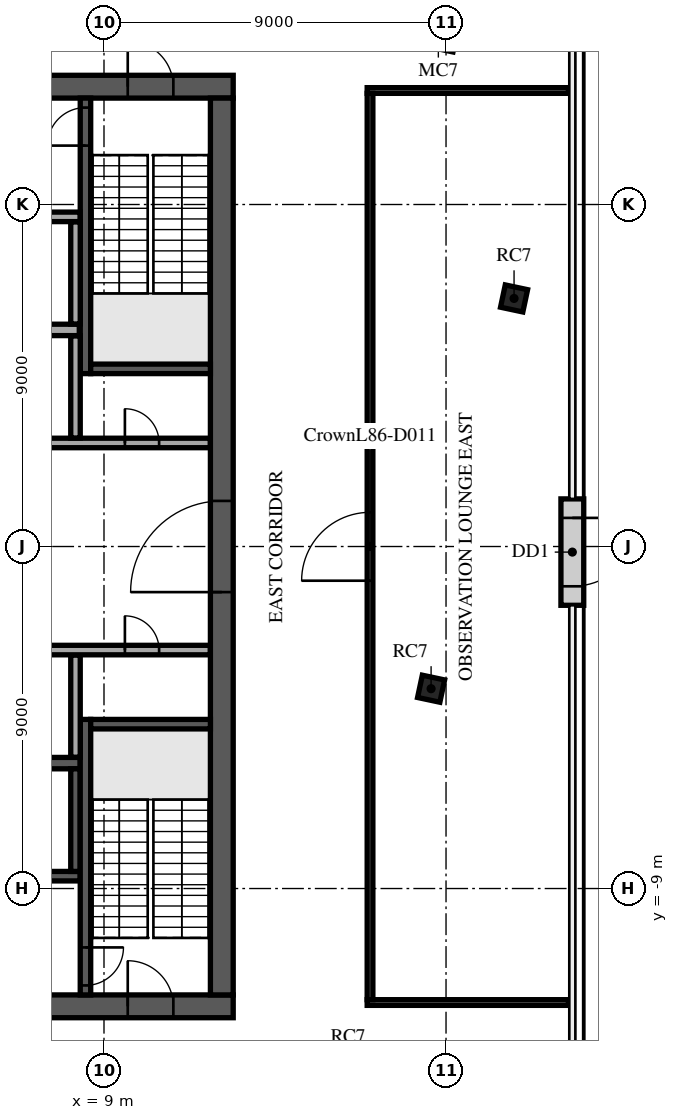
"""IFC4 building model, lengths in metres.
Left out: names, types, materials, properties, quantities, classifications, styles, units other than length and angle.
Written with IfcOpenShell. Run it as: python <this file> out.ifc"""

import sys

from ifc_helpers import new_model, si_unit, direction, frame, frame_2d, origin, origin_2d, place, context, subcontext, project, spatial, rectangle, extrude, element, fill, save


model = new_model("IFC4")
c1 = context("Model", 3, precision=1e-05, world=origin(), true_north=direction((0.0, 1.0)))
c2 = subcontext(c1, "Body", "Model", "MODEL_VIEW")
j1 = project(units=[si_unit("LENGTHUNIT", "METRE"), si_unit("PLANEANGLEUNIT", "RADIAN")], contexts=[c1])
p1 = place(None, origin())
s1 = spatial("IfcSite", under=j1, at=p1, CompositionType="ELEMENT")
p2 = place(p1, origin())
s2 = spatial("IfcBuilding", under=s1, at=p2, CompositionType="ELEMENT")
p3 = place(p2, frame((0.0, 0.0, 368.1)))
s3 = spatial("IfcBuildingStorey", under=s2, at=p3, CompositionType="ELEMENT", Elevation=368.1)
for number, where, z_axis, x_axis in (
    (1, (17.607, -3.742, 0.0), (0.0, 0.0, 1.0), (0.208, 0.978, 0.0)),
    (2, (19.79, 6.528, 0.0), (0.0, 0.0, 1.0), (0.208, 0.978, 0.0)),
):
    element("IfcColumn", number, at=place(p3, frame(where, z_axis=z_axis, x_axis=x_axis)), inside=s3, PredefinedType="COLUMN", context=c2, shape_type="SweptSolid", body=[
        extrude(rectangle(XDim=0.6, YDim=0.6, at=origin_2d()), origin(), (0.0, 0.0, 1.0), 5.0),
    ])
p4 = place(p3, frame((-12.4, 12.1, 0.0), z_axis=(0.0, 0.0, 1.0), x_axis=(1.0, 0.0, 0.0)))
e3 = element("IfcWall", 3, at=p4, inside=s3, PredefinedType="SHEAR", context=c2, shape_type="SweptSolid", body=[
    extrude(rectangle(XDim=24.8, YDim=0.6, at=frame_2d((12.4, 0.0))), origin(), (0.0, 0.0, 1.0), 4.7),
])
p5 = place(p4, frame((11.2, 0.0, 0.0)))
e4 = element("IfcOpeningElement", 4, at=p5, cuts=e3, PredefinedType="OPENING", context=c2, shape_type="SweptSolid", body=[
    extrude(rectangle(XDim=2.4, YDim=2.4, at=frame_2d((1.2, 1.2))), frame((0.0, 0.31, 0.0), z_axis=(0.0, -1.0, 0.0), x_axis=(1.0, 0.0, 0.0)), (0.0, 0.0, 1.0), 0.62),
])
p6 = place(p4, frame((22.025, 0.0, 0.0)))
e5 = element("IfcOpeningElement", 5, at=p6, cuts=e3, PredefinedType="OPENING", context=c2, shape_type="SweptSolid", body=[
    extrude(rectangle(XDim=1.2, YDim=2.1, at=frame_2d((0.6, 1.05))), frame((0.0, 0.31, 0.0), z_axis=(0.0, -1.0, 0.0), x_axis=(1.0, 0.0, 0.0)), (0.0, 0.0, 1.0), 0.62),
])
p7 = place(p4, frame((1.0, 0.0, 0.0)))
e6 = element("IfcOpeningElement", 6, at=p7, cuts=e3, PredefinedType="OPENING", context=c2, shape_type="SweptSolid", body=[
    extrude(rectangle(XDim=1.0, YDim=2.1, at=frame_2d((0.5, 1.05))), frame((0.0, 0.31, 0.0), z_axis=(0.0, -1.0, 0.0), x_axis=(1.0, 0.0, 0.0)), (0.0, 0.0, 1.0), 0.62),
])
p8 = place(p3, frame((-12.4, -12.1, 0.0), z_axis=(0.0, 0.0, 1.0), x_axis=(1.0, 0.0, 0.0)))
e7 = element("IfcWall", 7, at=p8, inside=s3, PredefinedType="SHEAR", context=c2, shape_type="SweptSolid", body=[
    extrude(rectangle(XDim=24.8, YDim=0.6, at=frame_2d((12.4, 0.0))), origin(), (0.0, 0.0, 1.0), 4.7),
])
p9 = place(p8, frame((7.3, 0.0, 0.0)))
e8 = element("IfcOpeningElement", 8, at=p9, cuts=e7, PredefinedType="OPENING", context=c2, shape_type="SweptSolid", body=[
    extrude(rectangle(XDim=2.0, YDim=2.1, at=frame_2d((1.0, 1.05))), frame((0.0, 0.31, 0.0), z_axis=(0.0, -1.0, 0.0), x_axis=(1.0, 0.0, 0.0)), (0.0, 0.0, 1.0), 0.62),
])
p10 = place(p8, frame((17.425, 0.0, 0.0)))
e9 = element("IfcOpeningElement", 9, at=p10, cuts=e7, PredefinedType="OPENING", context=c2, shape_type="SweptSolid", body=[
    extrude(rectangle(XDim=1.2, YDim=2.1, at=frame_2d((0.6, 1.05))), frame((0.0, 0.31, 0.0), z_axis=(0.0, -1.0, 0.0), x_axis=(1.0, 0.0, 0.0)), (0.0, 0.0, 1.0), 0.62),
])
p11 = place(p8, frame((1.575, 0.0, 0.0)))
e10 = element("IfcOpeningElement", 10, at=p11, cuts=e7, PredefinedType="OPENING", context=c2, shape_type="SweptSolid", body=[
    extrude(rectangle(XDim=1.2, YDim=2.1, at=frame_2d((0.6, 1.05))), frame((0.0, 0.31, 0.0), z_axis=(0.0, -1.0, 0.0), x_axis=(1.0, 0.0, 0.0)), (0.0, 0.0, 1.0), 0.62),
])
p12 = place(p8, frame((22.025, 0.0, 0.0)))
e11 = element("IfcOpeningElement", 11, at=p12, cuts=e7, PredefinedType="OPENING", context=c2, shape_type="SweptSolid", body=[
    extrude(rectangle(XDim=1.2, YDim=2.1, at=frame_2d((0.6, 1.05))), frame((0.0, 0.31, 0.0), z_axis=(0.0, -1.0, 0.0), x_axis=(1.0, 0.0, 0.0)), (0.0, 0.0, 1.0), 0.62),
])
p13 = place(p3, frame((12.1, -11.8, 0.0), z_axis=(0.0, 0.0, 1.0), x_axis=(0.0, 1.0, 0.0)))
e12 = element("IfcWall", 12, at=p13, inside=s3, PredefinedType="SHEAR", context=c2, shape_type="SweptSolid", body=[
    extrude(rectangle(XDim=23.6, YDim=0.6, at=frame_2d((11.8, 0.0))), origin(), (0.0, 0.0, 1.0), 4.7),
])
p14 = place(p13, frame((10.6, 0.0, 0.0)))
e13 = element("IfcOpeningElement", 13, at=p14, cuts=e12, PredefinedType="OPENING", context=c2, shape_type="SweptSolid", body=[
    extrude(rectangle(XDim=2.4, YDim=2.4, at=frame_2d((1.2, 1.2))), frame((0.0, 0.31, 0.0), z_axis=(0.0, -1.0, 0.0), x_axis=(1.0, 0.0, 0.0)), (0.0, 0.0, 1.0), 0.62),
])
p15 = place(p3, frame((-2.875, -5.7, 0.0), z_axis=(0.0, 0.0, 1.0), x_axis=(1.0, 0.0, 0.0)))
e14 = element("IfcWall", 14, at=p15, inside=s3, PredefinedType="SOLIDWALL", context=c2, shape_type="SweptSolid", body=[
    extrude(rectangle(XDim=11.25, YDim=0.3, at=frame_2d((5.625, 0.0))), origin(), (0.0, 0.0, 1.0), 4.7),
])
p16 = place(p3, frame((-2.875, -8.675, 0.0), z_axis=(0.0, 0.0, 1.0), x_axis=(1.0, 0.0, 0.0)))
e15 = element("IfcWall", 15, at=p16, inside=s3, PredefinedType="SOLIDWALL", context=c2, shape_type="SweptSolid", body=[
    extrude(rectangle(XDim=11.25, YDim=0.25, at=frame_2d((5.625, 0.0))), origin(), (0.0, 0.0, 1.0), 4.7),
])
p17 = place(p16, frame((0.9, 0.0, 0.0)))
e16 = element("IfcOpeningElement", 16, at=p17, cuts=e15, PredefinedType="OPENING", context=c2, shape_type="SweptSolid", body=[
    extrude(rectangle(XDim=1.2, YDim=2.1, at=frame_2d((0.6, 1.05))), frame((0.0, 0.135, 0.0), z_axis=(0.0, -1.0, 0.0), x_axis=(1.0, 0.0, 0.0)), (0.0, 0.0, 1.0), 0.27),
])
p18 = place(p16, frame((3.65, 0.0, 0.0)))
e17 = element("IfcOpeningElement", 17, at=p18, cuts=e15, PredefinedType="OPENING", context=c2, shape_type="SweptSolid", body=[
    extrude(rectangle(XDim=1.2, YDim=2.1, at=frame_2d((0.6, 1.05))), frame((0.0, 0.135, 0.0), z_axis=(0.0, -1.0, 0.0), x_axis=(1.0, 0.0, 0.0)), (0.0, 0.0, 1.0), 0.27),
])
p19 = place(p16, frame((6.4, 0.0, 0.0)))
e18 = element("IfcOpeningElement", 18, at=p19, cuts=e15, PredefinedType="OPENING", context=c2, shape_type="SweptSolid", body=[
    extrude(rectangle(XDim=1.2, YDim=2.1, at=frame_2d((0.6, 1.05))), frame((0.0, 0.135, 0.0), z_axis=(0.0, -1.0, 0.0), x_axis=(1.0, 0.0, 0.0)), (0.0, 0.0, 1.0), 0.27),
])
p20 = place(p16, frame((9.15, 0.0, 0.0)))
e19 = element("IfcOpeningElement", 19, at=p20, cuts=e15, PredefinedType="OPENING", context=c2, shape_type="SweptSolid", body=[
    extrude(rectangle(XDim=1.2, YDim=2.1, at=frame_2d((0.6, 1.05))), frame((0.0, 0.135, 0.0), z_axis=(0.0, -1.0, 0.0), x_axis=(1.0, 0.0, 0.0)), (0.0, 0.0, 1.0), 0.27),
])
p21 = place(p3, frame((8.25, -8.55, 0.0), z_axis=(0.0, 0.0, 1.0), x_axis=(0.0, 1.0, 0.0)))
e20 = element("IfcWall", 20, at=p21, inside=s3, PredefinedType="SOLIDWALL", context=c2, shape_type="SweptSolid", body=[
    extrude(rectangle(XDim=2.7, YDim=0.25, at=frame_2d((1.35, 0.0))), origin(), (0.0, 0.0, 1.0), 4.7),
])
p22 = place(p3, frame((8.512, 4.55, 0.0), z_axis=(0.0, 0.0, 1.0), x_axis=(0.0, 1.0, 0.0)))
e21 = element("IfcWall", 21, at=p22, inside=s3, PredefinedType="SOLIDWALL", context=c2, shape_type="SweptSolid", body=[
    extrude(rectangle(XDim=7.25, YDim=0.275, at=frame_2d((3.625, 0.0))), origin(), (0.0, 0.0, 1.0), 4.7),
])
p23 = place(p22, frame((6.0, 0.0, 0.0)))
e22 = element("IfcOpeningElement", 22, at=p23, cuts=e21, PredefinedType="OPENING", context=c2, shape_type="SweptSolid", body=[
    extrude(rectangle(XDim=1.0, YDim=2.1, at=frame_2d((0.5, 1.05))), frame((0.0, 0.147, 0.0), z_axis=(0.0, -1.0, 0.0), x_axis=(1.0, 0.0, 0.0)), (0.0, 0.0, 1.0), 0.295),
])
p24 = place(p3, frame((8.65, 4.675, 0.0), z_axis=(0.0, 0.0, 1.0), x_axis=(1.0, 0.0, 0.0)))
e23 = element("IfcWall", 23, at=p24, inside=s3, PredefinedType="SOLIDWALL", context=c2, shape_type="SweptSolid", body=[
    extrude(rectangle(XDim=3.15, YDim=0.25, at=frame_2d((1.575, 0.0))), origin(), (0.0, 0.0, 1.0), 4.7),
])
p25 = place(p3, frame((8.512, -4.55, 0.0), z_axis=(0.0, 0.0, 1.0), x_axis=(0.0, -1.0, 0.0)))
e24 = element("IfcWall", 24, at=p25, inside=s3, PredefinedType="SOLIDWALL", context=c2, shape_type="SweptSolid", body=[
    extrude(rectangle(XDim=7.25, YDim=0.275, at=frame_2d((3.625, 0.0))), origin(), (0.0, 0.0, 1.0), 4.7),
])
p26 = place(p25, frame((6.0, 0.0, 0.0)))
e25 = element("IfcOpeningElement", 25, at=p26, cuts=e24, PredefinedType="OPENING", context=c2, shape_type="SweptSolid", body=[
    extrude(rectangle(XDim=1.0, YDim=2.1, at=frame_2d((0.5, 1.05))), frame((0.0, 0.147, 0.0), z_axis=(0.0, -1.0, 0.0), x_axis=(1.0, 0.0, 0.0)), (0.0, 0.0, 1.0), 0.295),
])
p27 = place(p3, frame((8.65, -4.675, 0.0), z_axis=(0.0, 0.0, 1.0), x_axis=(1.0, 0.0, 0.0)))
e26 = element("IfcWall", 26, at=p27, inside=s3, PredefinedType="SOLIDWALL", context=c2, shape_type="SweptSolid", body=[
    extrude(rectangle(XDim=3.15, YDim=0.25, at=frame_2d((1.575, 0.0))), origin(), (0.0, 0.0, 1.0), 4.7),
])
p28 = place(p3, frame((8.25, -5.545, 0.0), z_axis=(0.0, 0.0, 1.0), x_axis=(0.0, 1.0, 0.0)))
e27 = element("IfcWall", 27, at=p28, inside=s3, PredefinedType="PARTITIONING", context=c2, shape_type="SweptSolid", body=[
    extrude(rectangle(XDim=2.69, YDim=0.25, at=frame_2d((1.345, 0.0))), origin(), (0.0, 0.0, 1.0), 4.7),
])
p29 = place(p3, frame((5.63, -2.725, 0.0), z_axis=(0.0, 0.0, 1.0), x_axis=(1.0, 0.0, 0.0)))
e28 = element("IfcWall", 28, at=p29, inside=s3, PredefinedType="PARTITIONING", context=c2, shape_type="SweptSolid", body=[
    extrude(rectangle(XDim=6.165, YDim=0.25, at=frame_2d((3.083, 0.0))), origin(), (0.0, 0.0, 1.0), 4.7),
])
p30 = place(p29, frame((0.745, 0.0, 0.0)))
e29 = element("IfcOpeningElement", 29, at=p30, cuts=e28, PredefinedType="OPENING", context=c2, shape_type="SweptSolid", body=[
    extrude(rectangle(XDim=1.0, YDim=2.1, at=frame_2d((0.5, 1.05))), frame((0.0, 0.135, 0.0), z_axis=(0.0, -1.0, 0.0), x_axis=(1.0, 0.0, 0.0)), (0.0, 0.0, 1.0), 0.27),
])
p31 = place(p29, frame((3.92, 0.0, 0.0)))
e30 = element("IfcOpeningElement", 30, at=p31, cuts=e28, PredefinedType="OPENING", context=c2, shape_type="SweptSolid", body=[
    extrude(rectangle(XDim=0.9, YDim=2.1, at=frame_2d((0.45, 1.05))), frame((0.0, 0.135, 0.0), z_axis=(0.0, -1.0, 0.0), x_axis=(1.0, 0.0, 0.0)), (0.0, 0.0, 1.0), 0.27),
])
p32 = place(p3, frame((-11.795, 2.725, 0.0), z_axis=(0.0, 0.0, 1.0), x_axis=(1.0, 0.0, 0.0)))
e31 = element("IfcWall", 31, at=p32, inside=s3, PredefinedType="PARTITIONING", context=c2, shape_type="SweptSolid", body=[
    extrude(rectangle(XDim=23.59, YDim=0.25, at=frame_2d((11.795, 0.0))), origin(), (0.0, 0.0, 1.0), 4.7),
])
p33 = place(p32, frame((21.345, 0.0, 0.0)))
e32 = element("IfcOpeningElement", 32, at=p33, cuts=e31, PredefinedType="OPENING", context=c2, shape_type="SweptSolid", body=[
    extrude(rectangle(XDim=0.9, YDim=2.1, at=frame_2d((0.45, 1.05))), frame((0.0, 0.135, 0.0), z_axis=(0.0, -1.0, 0.0), x_axis=(1.0, 0.0, 0.0)), (0.0, 0.0, 1.0), 0.27),
])
p34 = place(p32, frame((1.345, 0.0, 0.0)))
e33 = element("IfcOpeningElement", 33, at=p34, cuts=e31, PredefinedType="OPENING", context=c2, shape_type="SweptSolid", body=[
    extrude(rectangle(XDim=0.9, YDim=2.1, at=frame_2d((0.45, 1.05))), frame((0.0, 0.135, 0.0), z_axis=(0.0, -1.0, 0.0), x_axis=(1.0, 0.0, 0.0)), (0.0, 0.0, 1.0), 0.27),
])
p35 = place(p32, frame((4.32, 0.0, 0.0)))
e34 = element("IfcOpeningElement", 34, at=p35, cuts=e31, PredefinedType="OPENING", context=c2, shape_type="SweptSolid", body=[
    extrude(rectangle(XDim=1.2, YDim=2.1, at=frame_2d((0.6, 1.05))), frame((0.0, 0.135, 0.0), z_axis=(0.0, -1.0, 0.0), x_axis=(1.0, 0.0, 0.0)), (0.0, 0.0, 1.0), 0.27),
])
p36 = place(p32, frame((15.42, 0.0, 0.0)))
e35 = element("IfcOpeningElement", 35, at=p36, cuts=e31, PredefinedType="OPENING", context=c2, shape_type="SweptSolid", body=[
    extrude(rectangle(XDim=1.0, YDim=2.1, at=frame_2d((0.5, 1.05))), frame((0.0, 0.135, 0.0), z_axis=(0.0, -1.0, 0.0), x_axis=(1.0, 0.0, 0.0)), (0.0, 0.0, 1.0), 0.27),
])
p37 = place(p3, frame((8.25, 2.855, 0.0), z_axis=(0.0, 0.0, 1.0), x_axis=(0.0, 1.0, 0.0)))
e36 = element("IfcWall", 36, at=p37, inside=s3, PredefinedType="PARTITIONING", context=c2, shape_type="SweptSolid", body=[
    extrude(rectangle(XDim=2.69, YDim=0.25, at=frame_2d((1.345, 0.0))), origin(), (0.0, 0.0, 1.0), 4.7),
])
p38 = place(p3, frame((-8.35, 5.7, 0.0), z_axis=(0.0, 0.0, 1.0), x_axis=(1.0, 0.0, 0.0)))
e37 = element("IfcWall", 37, at=p38, inside=s3, PredefinedType="PARTITIONING", context=c2, shape_type="SweptSolid", body=[
    extrude(rectangle(XDim=16.7, YDim=0.3, at=frame_2d((8.35, 0.0))), origin(), (0.0, 0.0, 1.0), 4.7),
])
p39 = place(p3, frame((8.25, 5.855, 0.0), z_axis=(0.0, 0.0, 1.0), x_axis=(0.0, 1.0, 0.0)))
e38 = element("IfcWall", 38, at=p39, inside=s3, PredefinedType="PARTITIONING", context=c2, shape_type="SweptSolid", body=[
    extrude(rectangle(XDim=2.69, YDim=0.25, at=frame_2d((1.345, 0.0))), origin(), (0.0, 0.0, 1.0), 4.7),
])
p40 = place(p3, frame((-8.35, 8.675, 0.0), z_axis=(0.0, 0.0, 1.0), x_axis=(1.0, 0.0, 0.0)))
e39 = element("IfcWall", 39, at=p40, inside=s3, PredefinedType="PARTITIONING", context=c2, shape_type="SweptSolid", body=[
    extrude(rectangle(XDim=16.72, YDim=0.25, at=frame_2d((8.36, 0.0))), origin(), (0.0, 0.0, 1.0), 4.7),
])
p41 = place(p40, frame((0.875, 0.0, 0.0)))
e40 = element("IfcOpeningElement", 40, at=p41, cuts=e39, PredefinedType="OPENING", context=c2, shape_type="SweptSolid", body=[
    extrude(rectangle(XDim=1.2, YDim=2.1, at=frame_2d((0.6, 1.05))), frame((0.0, 0.135, 0.0), z_axis=(0.0, -1.0, 0.0), x_axis=(1.0, 0.0, 0.0)), (0.0, 0.0, 1.0), 0.27),
])
p42 = place(p40, frame((11.975, 0.0, 0.0)))
e41 = element("IfcOpeningElement", 41, at=p42, cuts=e39, PredefinedType="OPENING", context=c2, shape_type="SweptSolid", body=[
    extrude(rectangle(XDim=1.0, YDim=2.1, at=frame_2d((0.5, 1.05))), frame((0.0, 0.135, 0.0), z_axis=(0.0, -1.0, 0.0), x_axis=(1.0, 0.0, 0.0)), (0.0, 0.0, 1.0), 0.27),
])
for number, where, z_axis, x_axis in (
    (42, (15.925, -12.0, 0.0), (0.0, 0.0, 1.0), (1.0, 0.0, 0.0)),
    (43, (15.925, 12.0, 0.0), (0.0, 0.0, 1.0), (1.0, 0.0, 0.0)),
):
    element("IfcWall", number, at=place(p3, frame(where, z_axis=z_axis, x_axis=x_axis)), inside=s3, PredefinedType="PARTITIONING", context=c2, shape_type="SweptSolid", body=[
        extrude(rectangle(XDim=5.298, YDim=0.15, at=frame_2d((2.649, 0.0))), origin(), (0.0, 0.0, 1.0), 4.7),
    ])
p43 = place(p3, frame((16.0, -11.925, 0.0), z_axis=(0.0, 0.0, 1.0), x_axis=(0.0, 1.0, 0.0)))
e44 = element("IfcWall", 44, at=p43, inside=s3, PredefinedType="PARTITIONING", context=c2, shape_type="SweptSolid", body=[
    extrude(rectangle(XDim=23.85, YDim=0.15, at=frame_2d((11.925, 0.0))), origin(), (0.0, 0.0, 1.0), 4.32),
])
p44 = place(p43, frame((11.025, 0.0, 0.0)))
e45 = element("IfcOpeningElement", 45, at=p44, cuts=e44, PredefinedType="OPENING", context=c2, shape_type="SweptSolid", body=[
    extrude(rectangle(XDim=1.8, YDim=2.1, at=frame_2d((0.9, 1.05))), frame((0.0, 0.085, 0.0), z_axis=(0.0, -1.0, 0.0), x_axis=(1.0, 0.0, 0.0)), (0.0, 0.0, 1.0), 0.17),
])
p45 = place(p3, frame((21.323, 1.253, 0.0), z_axis=(0.0, 0.0, 1.0), x_axis=(0.0, -1.0, 0.0)))
e46 = element("IfcWall", 46, at=p45, inside=s3, PredefinedType="STANDARD", context=c2, shape_type="SweptSolid", body=[
    extrude(rectangle(XDim=2.8, YDim=0.6, at=frame_2d((1.4, 0.0))), origin(), (0.0, 0.0, 1.0), 4.7),
])
p46 = place(p45, frame((0.5, 0.0, 0.0)))
e47 = element("IfcOpeningElement", 47, at=p46, cuts=e46, PredefinedType="OPENING", context=c2, shape_type="SweptSolid", body=[
    extrude(rectangle(XDim=1.8, YDim=2.4, at=frame_2d((0.9, 1.2))), frame((0.0, 0.31, 0.0), z_axis=(0.0, -1.0, 0.0), x_axis=(1.0, 0.0, 0.0)), (0.0, 0.0, 1.0), 0.62),
])
p47 = place(p6, origin())
e48 = element("IfcDoor", 48, at=p47, inside=s3, OperationType="SINGLE_SWING_LEFT", PredefinedType="DOOR", context=c2, shape_type="SweptSolid", body=[
    extrude(rectangle(XDim=1.2, YDim=2.1, at=frame_2d((0.6, 1.05))), frame((0.0, 0.025, 0.0), z_axis=(0.0, -1.0, 0.0), x_axis=(1.0, 0.0, 0.0)), (0.0, 0.0, 1.0), 0.05),
])
fill(e5, e48)
p48 = place(p12, origin())
e49 = element("IfcDoor", 49, at=p48, inside=s3, OperationType="SINGLE_SWING_LEFT", PredefinedType="DOOR", context=c2, shape_type="SweptSolid", body=[
    extrude(rectangle(XDim=1.2, YDim=2.1, at=frame_2d((0.6, 1.05))), frame((0.0, 0.025, 0.0), z_axis=(0.0, -1.0, 0.0), x_axis=(1.0, 0.0, 0.0)), (0.0, 0.0, 1.0), 0.05),
])
fill(e11, e49)
p49 = place(p14, origin())
e50 = element("IfcDoor", 50, at=p49, inside=s3, OperationType="SINGLE_SWING_LEFT", PredefinedType="DOOR", context=c2, shape_type="SweptSolid", body=[
    extrude(rectangle(XDim=2.4, YDim=2.4, at=frame_2d((1.2, 1.2))), frame((0.0, 0.025, 0.0), z_axis=(0.0, -1.0, 0.0), x_axis=(1.0, 0.0, 0.0)), (0.0, 0.0, 1.0), 0.05),
])
fill(e13, e50)
p50 = place(p23, origin())
e51 = element("IfcDoor", 51, at=p50, inside=s3, OperationType="SINGLE_SWING_LEFT", PredefinedType="DOOR", context=c2, shape_type="SweptSolid", body=[
    extrude(rectangle(XDim=1.0, YDim=2.1, at=frame_2d((0.5, 1.05))), frame((0.0, 0.025, 0.0), z_axis=(0.0, -1.0, 0.0), x_axis=(1.0, 0.0, 0.0)), (0.0, 0.0, 1.0), 0.05),
])
fill(e22, e51)
p51 = place(p26, origin())
e52 = element("IfcDoor", 52, at=p51, inside=s3, OperationType="SINGLE_SWING_LEFT", PredefinedType="DOOR", context=c2, shape_type="SweptSolid", body=[
    extrude(rectangle(XDim=1.0, YDim=2.1, at=frame_2d((0.5, 1.05))), frame((0.0, 0.025, 0.0), z_axis=(0.0, -1.0, 0.0), x_axis=(1.0, 0.0, 0.0)), (0.0, 0.0, 1.0), 0.05),
])
fill(e25, e52)
p52 = place(p33, origin())
e53 = element("IfcDoor", 53, at=p52, inside=s3, OperationType="SINGLE_SWING_LEFT", PredefinedType="DOOR", context=c2, shape_type="SweptSolid", body=[
    extrude(rectangle(XDim=0.9, YDim=2.1, at=frame_2d((0.45, 1.05))), frame((0.0, 0.025, 0.0), z_axis=(0.0, -1.0, 0.0), x_axis=(1.0, 0.0, 0.0)), (0.0, 0.0, 1.0), 0.05),
])
fill(e32, e53)
p53 = place(p31, origin())
e54 = element("IfcDoor", 54, at=p53, inside=s3, OperationType="SINGLE_SWING_LEFT", PredefinedType="DOOR", context=c2, shape_type="SweptSolid", body=[
    extrude(rectangle(XDim=0.9, YDim=2.1, at=frame_2d((0.45, 1.05))), frame((0.0, 0.025, 0.0), z_axis=(0.0, -1.0, 0.0), x_axis=(1.0, 0.0, 0.0)), (0.0, 0.0, 1.0), 0.05),
])
fill(e30, e54)
p54 = place(p44, origin())
e55 = element("IfcDoor", 55, at=p54, inside=s3, OperationType="DOUBLE_DOOR_SINGLE_SWING", PredefinedType="DOOR", context=c2, shape_type="SweptSolid", body=[
    extrude(rectangle(XDim=1.8, YDim=2.1, at=frame_2d((0.9, 1.05))), frame((0.0, 0.025, 0.0), z_axis=(0.0, -1.0, 0.0), x_axis=(1.0, 0.0, 0.0)), (0.0, 0.0, 1.0), 0.05),
])
fill(e45, e55)
p55 = place(p46, origin())
e56 = element("IfcDoor", 56, at=p55, inside=s3, OperationType="DOUBLE_DOOR_SINGLE_SWING", PredefinedType="DOOR", context=c2, shape_type="SweptSolid", body=[
    extrude(rectangle(XDim=1.8, YDim=2.4, at=frame_2d((0.9, 1.2))), frame((0.0, 0.025, 0.0), z_axis=(0.0, -1.0, 0.0), x_axis=(1.0, 0.0, 0.0)), (0.0, 0.0, 1.0), 0.05),
])
fill(e47, e56)
save(model, sys.argv[1])
